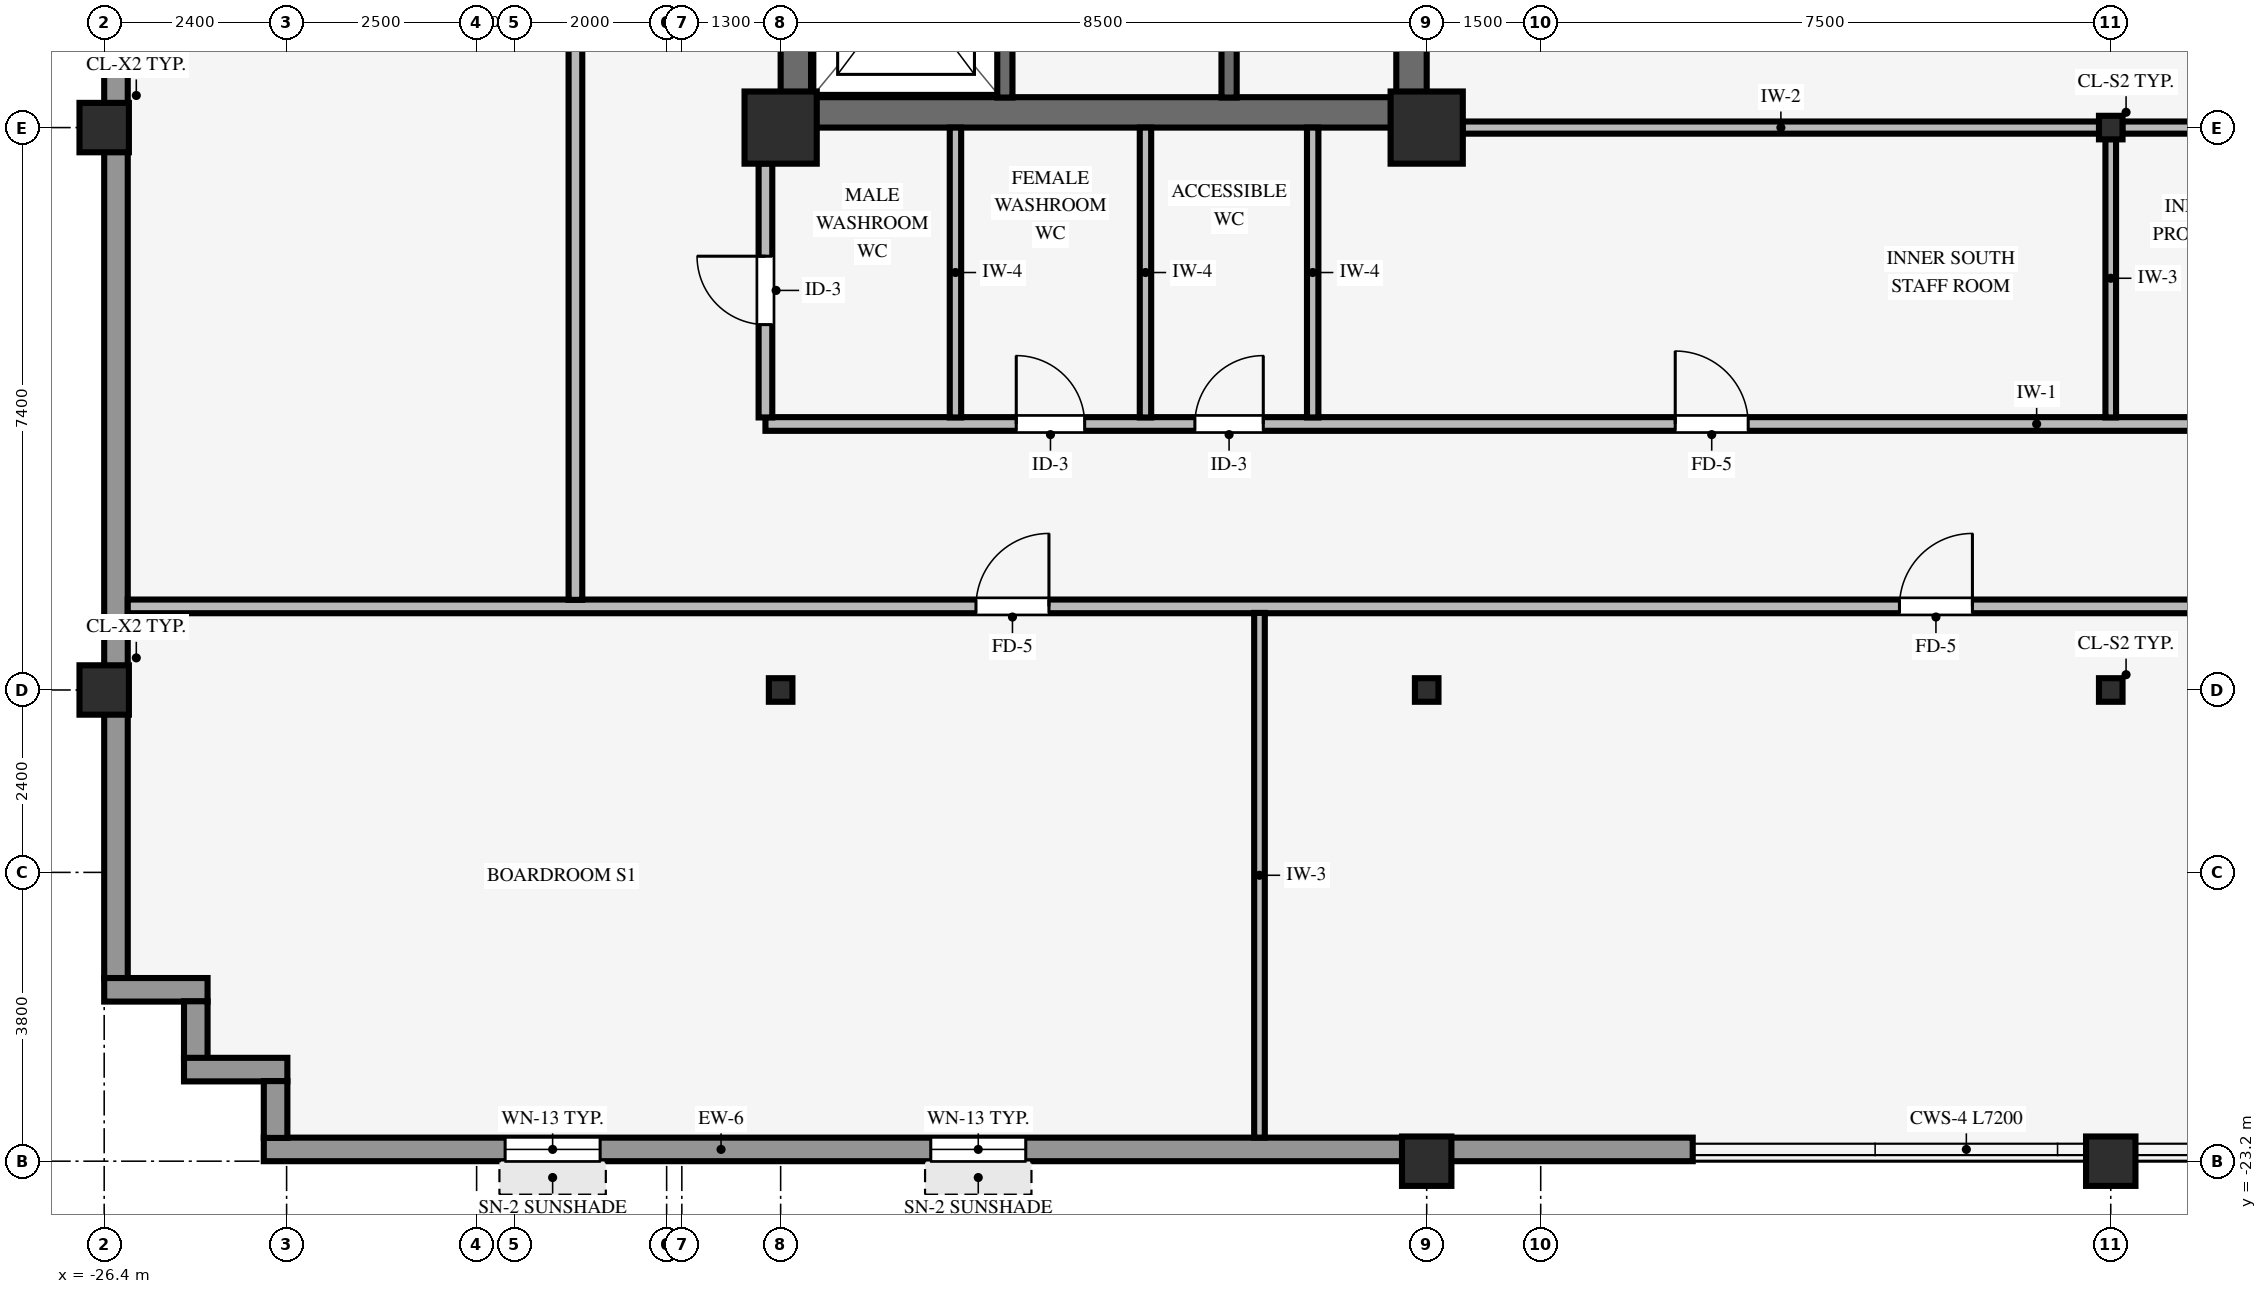
"""IFC4 building model, lengths in metres.
Left out: names, types, materials, properties, quantities, classifications, styles, units other than length and angle.
Written with IfcOpenShell. Run it as: python <this file> out.ifc"""

import sys

from ifc_helpers import new_model, si_unit, direction, frame, frame_2d, origin, origin_2d, place, context, subcontext, project, spatial, rectangle, hollow_rectangle, i_section, extrude, source, transform, mapped, element, fill, save


model = new_model("IFC4")
c1 = context("Model", 3, precision=1e-05, world=origin(), true_north=direction((0.0, 1.0)))
c2 = subcontext(c1, "Body", "Model", "MODEL_VIEW")
j1 = project(units=[si_unit("LENGTHUNIT", "METRE"), si_unit("PLANEANGLEUNIT", "RADIAN")], contexts=[c1])
p1 = place(None, origin())
s1 = spatial("IfcSite", under=j1, at=p1, CompositionType="ELEMENT")
p2 = place(p1, origin())
s2 = spatial("IfcBuilding", under=s1, at=p2, CompositionType="ELEMENT")
p3 = place(p2, frame((0.0, 0.0, 167.65)))
s3 = spatial("IfcBuildingStorey", under=s2, at=p3, CompositionType="ELEMENT", Elevation=167.65)
p4 = place(p3, frame((-17.5, -9.4, 0.0), z_axis=(0.0, 0.0, 1.0), x_axis=(1.0, 0.0, 0.0)))
e1 = element("IfcWall", 1, at=p4, inside=s3, PredefinedType="SHEAR", context=c2, shape_type="SweptSolid", body=[
    extrude(rectangle(XDim=8.5, YDim=0.4, at=frame_2d((4.25, 0.0))), origin(), (0.0, 0.0, 1.0), 3.37),
])
p5 = place(p3, frame((-17.3, -9.205, 0.0), z_axis=(0.0, 0.0, 1.0), x_axis=(0.0, 1.0, 0.0)))
e2 = element("IfcWall", 2, at=p5, inside=s3, PredefinedType="SHEAR", context=c2, shape_type="SweptSolid", body=[
    extrude(rectangle(XDim=18.41, YDim=0.4, at=frame_2d((9.205, 0.0))), origin(), (0.0, 0.0, 1.0), 3.37),
])
p6 = place(p3, frame((-9.2, -9.205, 0.0), z_axis=(0.0, 0.0, 1.0), x_axis=(0.0, 1.0, 0.0)))
e3 = element("IfcWall", 3, at=p6, inside=s3, PredefinedType="SHEAR", context=c2, shape_type="SweptSolid", body=[
    extrude(rectangle(XDim=18.41, YDim=0.4, at=frame_2d((9.205, 0.0))), origin(), (0.0, 0.0, 1.0), 3.37),
])
p7 = place(p6, frame((8.605, 0.0, 0.0)))
e4 = element("IfcOpeningElement", 4, at=p7, cuts=e3, PredefinedType="OPENING", context=c2, shape_type="SweptSolid", body=[
    extrude(rectangle(XDim=1.2, YDim=2.15, at=frame_2d((0.6, 1.075))), frame((0.0, 0.21, 0.0), z_axis=(0.0, -1.0, 0.0), x_axis=(1.0, 0.0, 0.0)), (0.0, 0.0, 1.0), 0.42),
])
for number, where, z_axis, x_axis in (
    (5, (-17.5, -9.6, 0.0), (0.0, 0.0, 1.0), (1.0, 0.0, 0.0)),
    (6, (-9.0, -9.6, 0.0), (0.0, 0.0, 1.0), (1.0, 0.0, 0.0)),
):
    element("IfcColumn", number, at=place(p3, frame(where, z_axis=z_axis, x_axis=x_axis)), inside=s3, PredefinedType="COLUMN", context=c2, shape_type="SweptSolid", body=[
        extrude(rectangle(XDim=0.95, YDim=0.95, at=origin_2d()), origin(), (0.0, 0.0, 1.0), 3.37),
    ])
for number, where, z_axis, x_axis in (
    (7, (-26.4, -17.0, 0.0), (0.0, 0.0, 1.0), (1.0, 0.0, 0.0)),
    (8, (-26.4, -9.6, 0.0), (0.0, 0.0, 1.0), (1.0, 0.0, 0.0)),
    (9, (-9.0, -23.2, 0.0), (0.0, 0.0, 1.0), (1.0, 0.0, 0.0)),
    (10, (0.0, -23.2, 0.0), (0.0, 0.0, 1.0), (1.0, 0.0, 0.0)),
):
    element("IfcColumn", number, at=place(p3, frame(where, z_axis=z_axis, x_axis=x_axis)), inside=s3, PredefinedType="COLUMN", context=c2, shape_type="SweptSolid", body=[
        extrude(hollow_rectangle(XDim=0.65, YDim=0.65, WallThickness=0.04, InnerFilletRadius=0.04, OuterFilletRadius=0.08, at=origin_2d()), origin(), (0.0, 0.0, 1.0), 3.37),
    ])
for number, where, z_axis, x_axis in (
    (11, (0.0, -17.0, 0.0), (0.0, 0.0, 1.0), (1.0, 0.0, 0.0)),
    (12, (0.0, -9.6, 0.0), (0.0, 0.0, 1.0), (1.0, 0.0, 0.0)),
    (13, (-17.5, -17.0, 0.0), (0.0, 0.0, 1.0), (1.0, 0.0, 0.0)),
    (14, (-9.0, -17.0, 0.0), (0.0, 0.0, 1.0), (1.0, 0.0, 0.0)),
):
    element("IfcColumn", number, at=place(p3, frame(where, z_axis=z_axis, x_axis=x_axis)), inside=s3, PredefinedType="COLUMN", context=c2, shape_type="SweptSolid", body=[
        extrude(i_section(OverallWidth=0.31, OverallDepth=0.31, WebThickness=0.015, FlangeThickness=0.015, FilletRadius=0.015, at=origin_2d()), origin(), (0.0, 0.0, 1.0), 3.37),
    ])
p8 = place(p3, frame((-24.3, -23.045, 0.0), z_axis=(0.0, 0.0, 1.0), x_axis=(1.0, 0.0, 0.0)))
e15 = element("IfcWall", 15, at=p8, inside=s3, PredefinedType="STANDARD", context=c2, shape_type="SweptSolid", body=[
    extrude(rectangle(XDim=18.8, YDim=0.31, at=frame_2d((9.4, 0.0))), origin(), (0.0, 0.0, 1.0), 2.705),
])
p9 = place(p8, frame((3.175, 0.0, 0.8)))
e16 = element("IfcOpeningElement", 16, at=p9, cuts=e15, PredefinedType="OPENING", context=c2, shape_type="SweptSolid", body=[
    extrude(rectangle(XDim=1.25, YDim=1.52, at=frame_2d((0.625, 0.76))), frame((0.0, 0.165, 0.0), z_axis=(0.0, -1.0, 0.0), x_axis=(1.0, 0.0, 0.0)), (0.0, 0.0, 1.0), 0.33),
])
p10 = place(p8, frame((8.775, 0.0, 0.8)))
e17 = element("IfcOpeningElement", 17, at=p10, cuts=e15, PredefinedType="OPENING", context=c2, shape_type="SweptSolid", body=[
    extrude(rectangle(XDim=1.25, YDim=1.52, at=frame_2d((0.625, 0.76))), frame((0.0, 0.165, 0.0), z_axis=(0.0, -1.0, 0.0), x_axis=(1.0, 0.0, 0.0)), (0.0, 0.0, 1.0), 0.33),
])
p11 = place(p3, frame((-26.245, -20.794, 0.0), z_axis=(0.0, 0.0, 1.0), x_axis=(0.0, 1.0, 0.0)))
e18 = element("IfcWall", 18, at=p11, inside=s3, PredefinedType="STANDARD", context=c2, shape_type="SweptSolid", body=[
    extrude(rectangle(XDim=15.294, YDim=0.31, at=frame_2d((7.647, 0.0))), origin(), (0.0, 0.0, 1.0), 2.705),
])
p12 = place(p3, frame((-26.4, -20.945, 0.0), z_axis=(0.0, 0.0, 1.0), x_axis=(1.0, 0.0, 0.0)))
e19 = element("IfcWall", 19, at=p12, inside=s3, PredefinedType="STANDARD", context=c2, shape_type="SweptSolid", body=[
    extrude(rectangle(XDim=1.36, YDim=0.31, at=frame_2d((0.68, 0.0))), origin(), (0.0, 0.0, 1.0), 3.36),
])
p13 = place(p3, frame((-25.195, -21.844, 0.0), z_axis=(0.0, 0.0, 1.0), x_axis=(0.0, 1.0, 0.0)))
e20 = element("IfcWall", 20, at=p13, inside=s3, PredefinedType="STANDARD", context=c2, shape_type="SweptSolid", body=[
    extrude(rectangle(XDim=0.748, YDim=0.31, at=frame_2d((0.374, 0.0))), origin(), (0.0, 0.0, 1.0), 3.36),
])
p14 = place(p3, frame((-25.35, -21.995, 0.0), z_axis=(0.0, 0.0, 1.0), x_axis=(1.0, 0.0, 0.0)))
e21 = element("IfcWall", 21, at=p14, inside=s3, PredefinedType="STANDARD", context=c2, shape_type="SweptSolid", body=[
    extrude(rectangle(XDim=1.36, YDim=0.31, at=frame_2d((0.68, 0.0))), origin(), (0.0, 0.0, 1.0), 3.36),
])
p15 = place(p3, frame((-24.145, -22.894, 0.0), z_axis=(0.0, 0.0, 1.0), x_axis=(0.0, 1.0, 0.0)))
e22 = element("IfcWall", 22, at=p15, inside=s3, PredefinedType="STANDARD", context=c2, shape_type="SweptSolid", body=[
    extrude(rectangle(XDim=0.748, YDim=0.31, at=frame_2d((0.374, 0.0))), origin(), (0.0, 0.0, 1.0), 3.36),
])
p16 = place(p3, frame((-14.55, -9.205, 0.0), z_axis=(0.0, 0.0, 1.0), x_axis=(0.0, 1.0, 0.0)))
e23 = element("IfcWall", 23, at=p16, inside=s3, PredefinedType="SHEAR", context=c2, shape_type="SweptSolid", body=[
    extrude(rectangle(XDim=3.01, YDim=0.2, at=frame_2d((1.505, 0.0))), origin(), (0.0, 0.0, 1.0), 3.37),
])
p17 = place(p16, frame((0.93, 0.0, 0.0)))
e24 = element("IfcOpeningElement", 24, at=p17, cuts=e23, PredefinedType="OPENING", context=c2, shape_type="SweptSolid", body=[
    extrude(rectangle(XDim=1.15, YDim=2.15, at=frame_2d((0.575, 1.075))), frame((0.0, 0.11, 0.0), z_axis=(0.0, -1.0, 0.0), x_axis=(1.0, 0.0, 0.0)), (0.0, 0.0, 1.0), 0.22),
])
p18 = place(p3, frame((-11.6, -9.205, 0.0), z_axis=(0.0, 0.0, 1.0), x_axis=(0.0, 1.0, 0.0)))
e25 = element("IfcWall", 25, at=p18, inside=s3, PredefinedType="SHEAR", context=c2, shape_type="SweptSolid", body=[
    extrude(rectangle(XDim=7.975, YDim=0.2, at=frame_2d((3.988, 0.0))), origin(), (0.0, 0.0, 1.0), 3.37),
])
p19 = place(p18, frame((5.565, 0.0, 0.0)))
e26 = element("IfcOpeningElement", 26, at=p19, cuts=e25, PredefinedType="OPENING", context=c2, shape_type="SweptSolid", body=[
    extrude(rectangle(XDim=0.88, YDim=2.1, at=frame_2d((0.44, 1.05))), frame((0.0, 0.11, 0.0), z_axis=(0.0, -1.0, 0.0), x_axis=(1.0, 0.0, 0.0)), (0.0, 0.0, 1.0), 0.22),
])
p20 = place(p3, frame((-26.09, -15.9, 0.0), z_axis=(0.0, 0.0, 1.0), x_axis=(1.0, 0.0, 0.0)))
e27 = element("IfcWall", 27, at=p20, inside=s3, PredefinedType="PARTITIONING", context=c2, shape_type="SweptSolid", body=[
    extrude(rectangle(XDim=48.38, YDim=0.18, at=frame_2d((24.19, 0.0))), origin(), (0.0, 0.0, 1.0), 3.36),
])
p21 = place(p20, frame((23.31, 0.0, 0.0)))
e28 = element("IfcOpeningElement", 28, at=p21, cuts=e27, PredefinedType="OPENING", context=c2, shape_type="SweptSolid", body=[
    extrude(rectangle(XDim=0.96, YDim=2.1, at=frame_2d((0.48, 1.05))), frame((0.0, 0.1, 0.0), z_axis=(0.0, -1.0, 0.0), x_axis=(1.0, 0.0, 0.0)), (0.0, 0.0, 1.0), 0.2),
])
p22 = place(p20, frame((11.16, 0.0, 0.0)))
e29 = element("IfcOpeningElement", 29, at=p22, cuts=e27, PredefinedType="OPENING", context=c2, shape_type="SweptSolid", body=[
    extrude(rectangle(XDim=0.96, YDim=2.1, at=frame_2d((0.48, 1.05))), frame((0.0, 0.1, 0.0), z_axis=(0.0, -1.0, 0.0), x_axis=(1.0, 0.0, 0.0)), (0.0, 0.0, 1.0), 0.2),
])
p23 = place(p3, frame((-17.7, -13.5, 0.0), z_axis=(0.0, 0.0, 1.0), x_axis=(1.0, 0.0, 0.0)))
e30 = element("IfcWall", 30, at=p23, inside=s3, PredefinedType="PARTITIONING", context=c2, shape_type="SweptSolid", body=[
    extrude(rectangle(XDim=24.3, YDim=0.18, at=frame_2d((12.15, 0.0))), origin(), (0.0, 0.0, 1.0), 3.008),
])
p24 = place(p23, frame((11.97, 0.0, 0.0)))
e31 = element("IfcOpeningElement", 31, at=p24, cuts=e30, PredefinedType="OPENING", context=c2, shape_type="SweptSolid", body=[
    extrude(rectangle(XDim=0.96, YDim=2.1, at=frame_2d((0.48, 1.05))), frame((0.0, 0.1, 0.0), z_axis=(0.0, -1.0, 0.0), x_axis=(1.0, 0.0, 0.0)), (0.0, 0.0, 1.0), 0.2),
])
p25 = place(p23, frame((20.52, 0.0, 0.0)))
e32 = element("IfcOpeningElement", 32, at=p25, cuts=e30, PredefinedType="OPENING", context=c2, shape_type="SweptSolid", body=[
    extrude(rectangle(XDim=0.96, YDim=2.1, at=frame_2d((0.48, 1.05))), frame((0.0, 0.1, 0.0), z_axis=(0.0, -1.0, 0.0), x_axis=(1.0, 0.0, 0.0)), (0.0, 0.0, 1.0), 0.2),
])
p26 = place(p23, frame((3.3, 0.0, 0.0)))
e33 = element("IfcOpeningElement", 33, at=p26, cuts=e30, PredefinedType="OPENING", context=c2, shape_type="SweptSolid", body=[
    extrude(rectangle(XDim=0.9, YDim=2.1, at=frame_2d((0.45, 1.05))), frame((0.0, 0.1, 0.0), z_axis=(0.0, -1.0, 0.0), x_axis=(1.0, 0.0, 0.0)), (0.0, 0.0, 1.0), 0.2),
])
p27 = place(p23, frame((5.65, 0.0, 0.0)))
e34 = element("IfcOpeningElement", 34, at=p27, cuts=e30, PredefinedType="OPENING", context=c2, shape_type="SweptSolid", body=[
    extrude(rectangle(XDim=0.9, YDim=2.1, at=frame_2d((0.45, 1.05))), frame((0.0, 0.1, 0.0), z_axis=(0.0, -1.0, 0.0), x_axis=(1.0, 0.0, 0.0)), (0.0, 0.0, 1.0), 0.2),
])
p28 = place(p3, frame((-8.529, -9.6, 0.0), z_axis=(0.0, 0.0, 1.0), x_axis=(1.0, 0.0, 0.0)))
e35 = element("IfcWall", 35, at=p28, inside=s3, PredefinedType="PARTITIONING", context=c2, shape_type="SweptSolid", body=[
    extrude(rectangle(XDim=8.378, YDim=0.16, at=frame_2d((4.189, 0.0))), origin(), (0.0, 0.0, 1.0), 2.405),
])
p29 = place(p3, frame((0.151, -9.6, 0.0), z_axis=(0.0, 0.0, 1.0), x_axis=(1.0, 0.0, 0.0)))
e36 = element("IfcWall", 36, at=p29, inside=s3, PredefinedType="PARTITIONING", context=c2, shape_type="SweptSolid", body=[
    extrude(rectangle(XDim=6.363, YDim=0.16, at=frame_2d((3.182, 0.0))), origin(), (0.0, 0.0, 1.0), 2.405),
])
p30 = place(p3, frame((-20.2, -15.814, 0.0), z_axis=(0.0, 0.0, 1.0), x_axis=(0.0, 1.0, 0.0)))
e37 = element("IfcWall", 37, at=p30, inside=s3, PredefinedType="PARTITIONING", context=c2, shape_type="SweptSolid", body=[
    extrude(rectangle(XDim=31.628, YDim=0.18, at=frame_2d((15.814, 0.0))), origin(), (0.0, 0.0, 1.0), 3.36),
])
p31 = place(p30, frame((15.334, 0.0, 0.0)))
e38 = element("IfcOpeningElement", 38, at=p31, cuts=e37, PredefinedType="OPENING", context=c2, shape_type="SweptSolid", body=[
    extrude(rectangle(XDim=0.96, YDim=2.1, at=frame_2d((0.48, 1.05))), frame((0.0, 0.1, 0.0), z_axis=(0.0, -1.0, 0.0), x_axis=(1.0, 0.0, 0.0)), (0.0, 0.0, 1.0), 0.2),
])
p32 = place(p3, frame((-17.7, -13.414, 0.0), z_axis=(0.0, 0.0, 1.0), x_axis=(0.0, 1.0, 0.0)))
e39 = element("IfcWall", 39, at=p32, inside=s3, PredefinedType="PARTITIONING", context=c2, shape_type="SweptSolid", body=[
    extrude(rectangle(XDim=3.343, YDim=0.18, at=frame_2d((1.671, 0.0))), origin(), (0.0, 0.0, 1.0), 2.816),
])
p33 = place(p32, frame((1.221, 0.0, 0.0)))
e40 = element("IfcOpeningElement", 40, at=p33, cuts=e39, PredefinedType="OPENING", context=c2, shape_type="SweptSolid", body=[
    extrude(rectangle(XDim=0.9, YDim=2.1, at=frame_2d((0.45, 1.05))), frame((0.0, 0.1, 0.0), z_axis=(0.0, -1.0, 0.0), x_axis=(1.0, 0.0, 0.0)), (0.0, 0.0, 1.0), 0.2),
])
for number, where, z_axis, x_axis in (
    (41, (-15.2, -13.414, 0.0), (0.0, 0.0, 1.0), (0.0, 1.0, 0.0)),
    (42, (-12.7, -13.414, 0.0), (0.0, 0.0, 1.0), (0.0, 1.0, 0.0)),
):
    element("IfcWall", number, at=place(p3, frame(where, z_axis=z_axis, x_axis=x_axis)), inside=s3, PredefinedType="PARTITIONING", context=c2, shape_type="SweptSolid", body=[
        extrude(rectangle(XDim=3.814, YDim=0.15, at=frame_2d((1.907, 0.0))), origin(), (0.0, 0.0, 1.0), 3.36),
    ])
p34 = place(p3, frame((-11.2, -22.89, 0.0), z_axis=(0.0, 0.0, 1.0), x_axis=(0.0, 1.0, 0.0)))
e43 = element("IfcWall", 43, at=p34, inside=s3, PredefinedType="PARTITIONING", context=c2, shape_type="SweptSolid", body=[
    extrude(rectangle(XDim=6.904, YDim=0.14, at=frame_2d((3.452, 0.0))), origin(), (0.0, 0.0, 1.0), 3.36),
])
p35 = place(p3, frame((-10.5, -13.414, 0.0), z_axis=(0.0, 0.0, 1.0), x_axis=(0.0, 1.0, 0.0)))
e44 = element("IfcWall", 44, at=p35, inside=s3, PredefinedType="PARTITIONING", context=c2, shape_type="SweptSolid", body=[
    extrude(rectangle(XDim=3.814, YDim=0.15, at=frame_2d((1.907, 0.0))), origin(), (0.0, 0.0, 1.0), 3.36),
])
p36 = place(p3, frame((0.0, -13.414, 0.0), z_axis=(0.0, 0.0, 1.0), x_axis=(0.0, 1.0, 0.0)))
e45 = element("IfcWall", 45, at=p36, inside=s3, PredefinedType="PARTITIONING", context=c2, shape_type="SweptSolid", body=[
    extrude(rectangle(XDim=3.663, YDim=0.14, at=frame_2d((1.832, 0.0))), origin(), (0.0, 0.0, 1.0), 2.816),
])
m1 = source(origin(), c2, "Body", "SweptSolid", [
    extrude(rectangle(XDim=1.25, YDim=1.52, at=frame_2d((0.625, 0.76))), frame((0.0, 0.03, 0.0), z_axis=(0.0, -1.0, 0.0), x_axis=(1.0, 0.0, 0.0)), (0.0, 0.0, 1.0), 0.06),
])
p37 = place(p9, origin())
e46 = element("IfcWindow", 46, at=p37, inside=s3, PartitioningType="SINGLE_PANEL", PredefinedType="WINDOW", context=c2, shape_type="MappedRepresentation", body=[
    mapped(m1, transform((0.0, 0.0, 0.0), scale=1.0)),
])
fill(e16, e46)
p38 = place(p10, origin())
e47 = element("IfcWindow", 47, at=p38, inside=s3, PartitioningType="SINGLE_PANEL", PredefinedType="WINDOW", context=c2, shape_type="MappedRepresentation", body=[
    mapped(m1, transform((0.0, 0.0, 0.0), scale=1.0)),
])
fill(e17, e47)
m2 = source(origin(), c2, "Body", "SweptSolid", [
    extrude(rectangle(XDim=0.96, YDim=2.1, at=frame_2d((0.48, 1.05))), frame((0.0, 0.025, 0.0), z_axis=(0.0, -1.0, 0.0), x_axis=(1.0, 0.0, 0.0)), (0.0, 0.0, 1.0), 0.05),
])
p39 = place(p21, origin())
e48 = element("IfcDoor", 48, at=p39, inside=s3, OperationType="SINGLE_SWING_RIGHT", PredefinedType="DOOR", context=c2, shape_type="MappedRepresentation", body=[
    mapped(m2, transform((0.0, 0.0, 0.0), scale=1.0)),
])
fill(e28, e48)
p40 = place(p24, origin())
e49 = element("IfcDoor", 49, at=p40, inside=s3, OperationType="SINGLE_SWING_LEFT", PredefinedType="DOOR", context=c2, shape_type="MappedRepresentation", body=[
    mapped(m2, transform((0.0, 0.0, 0.0), scale=1.0)),
])
fill(e31, e49)
p41 = place(p22, origin())
e50 = element("IfcDoor", 50, at=p41, inside=s3, OperationType="SINGLE_SWING_RIGHT", PredefinedType="DOOR", context=c2, shape_type="MappedRepresentation", body=[
    mapped(m2, transform((0.0, 0.0, 0.0), scale=1.0)),
])
fill(e29, e50)
m3 = source(origin(), c2, "Body", "SweptSolid", [
    extrude(rectangle(XDim=0.9, YDim=2.1, at=frame_2d((0.45, 1.05))), frame((0.0, 0.025, 0.0), z_axis=(0.0, -1.0, 0.0), x_axis=(1.0, 0.0, 0.0)), (0.0, 0.0, 1.0), 0.05),
])
p42 = place(p33, origin())
e51 = element("IfcDoor", 51, at=p42, inside=s3, OperationType="SINGLE_SWING_RIGHT", PredefinedType="DOOR", context=c2, shape_type="MappedRepresentation", body=[
    mapped(m3, transform((0.0, 0.0, 0.0), scale=1.0)),
])
fill(e40, e51)
p43 = place(p26, origin())
e52 = element("IfcDoor", 52, at=p43, inside=s3, OperationType="SINGLE_SWING_LEFT", PredefinedType="DOOR", context=c2, shape_type="MappedRepresentation", body=[
    mapped(m3, transform((0.0, 0.0, 0.0), scale=1.0)),
])
fill(e33, e52)
p44 = place(p27, origin())
e53 = element("IfcDoor", 53, at=p44, inside=s3, OperationType="SINGLE_SWING_RIGHT", PredefinedType="DOOR", context=c2, shape_type="MappedRepresentation", body=[
    mapped(m3, transform((0.0, 0.0, 0.0), scale=1.0)),
])
fill(e34, e53)
save(model, sys.argv[1])
